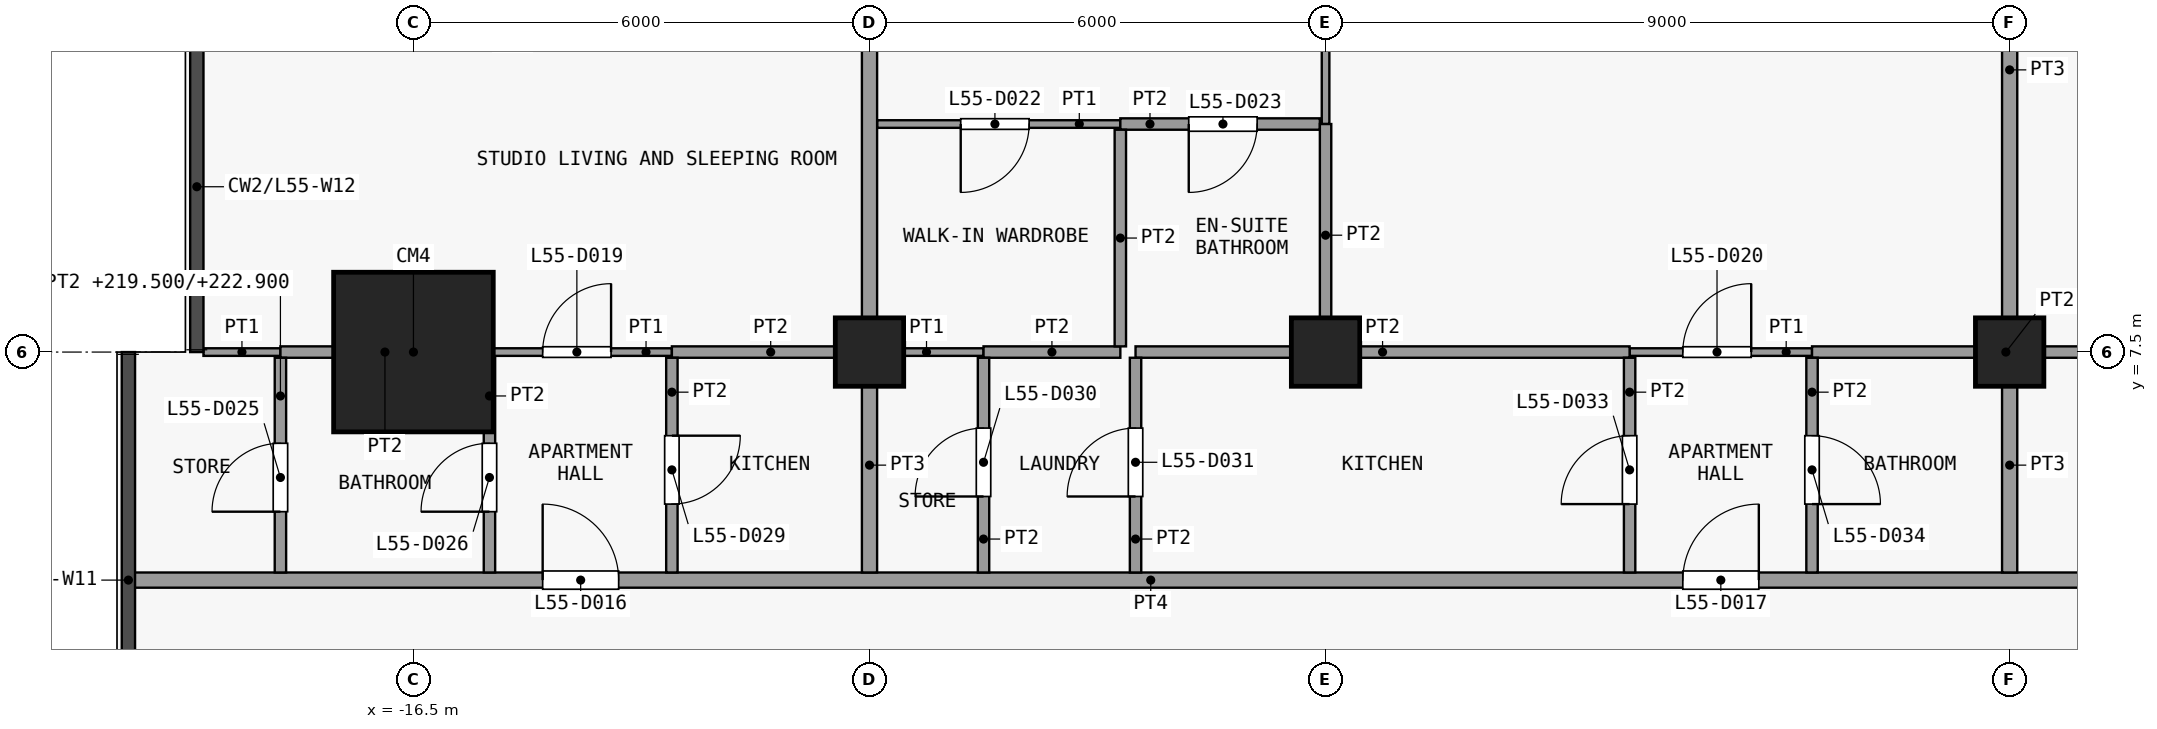
"""IFC4 building model, lengths in metres.
Left out: names, types, materials, properties, quantities, classifications, styles, units other than length and angle.
Written with IfcOpenShell. Run it as: python <this file> out.ifc"""

import sys

from ifc_helpers import new_model, si_unit, direction, frame, frame_2d, origin, origin_2d, place, context, subcontext, project, spatial, rectangle, extrude, element, fill, save


model = new_model("IFC4")
c1 = context("Model", 3, precision=1e-05, world=origin(), true_north=direction((0.0, 1.0)))
c2 = subcontext(c1, "Body", "Model", "MODEL_VIEW")
j1 = project(units=[si_unit("LENGTHUNIT", "METRE"), si_unit("PLANEANGLEUNIT", "RADIAN")], contexts=[c1])
p1 = place(None, origin())
s1 = spatial("IfcSite", under=j1, at=p1, CompositionType="ELEMENT")
p2 = place(p1, origin())
s2 = spatial("IfcBuilding", under=s1, at=p2, CompositionType="ELEMENT")
p3 = place(p2, frame((0.0, 0.0, 219.5)))
s3 = spatial("IfcBuildingStorey", under=s2, at=p3, CompositionType="ELEMENT", Elevation=219.5)
p4 = place(p3, frame((-16.5, 7.5, 0.0), z_axis=(0.0, 0.0, 1.0), x_axis=(1.0, 0.0, 0.0)))
e1 = element("IfcColumn", 1, at=p4, inside=s3, PredefinedType="COLUMN", context=c2, shape_type="SweptSolid", body=[
    extrude(rectangle(XDim=2.1, YDim=2.1, at=origin_2d()), origin(), (0.0, 0.0, 1.0), 3.6),
])
for number, where, z_axis, x_axis in (
    (2, (-10.5, 7.5, 0.0), (0.0, 0.0, 1.0), (1.0, 0.0, 0.0)),
    (3, (-4.5, 7.5, 0.0), (0.0, 0.0, 1.0), (1.0, 0.0, 0.0)),
    (4, (4.5, 7.5, 0.0), (0.0, 0.0, 1.0), (1.0, 0.0, 0.0)),
):
    element("IfcColumn", number, at=place(p3, frame(where, z_axis=z_axis, x_axis=x_axis)), inside=s3, PredefinedType="COLUMN", context=c2, shape_type="SweptSolid", body=[
        extrude(rectangle(XDim=0.9, YDim=0.9, at=origin_2d()), origin(), (0.0, 0.0, 1.0), 3.6),
    ])
p5 = place(p3, frame((-20.25, 4.5, 0.0), z_axis=(0.0, 0.0, 1.0), x_axis=(1.0, 0.0, 0.0)))
e5 = element("IfcWall", 5, at=p5, inside=s3, PredefinedType="PARTITIONING", context=c2, shape_type="SweptSolid", body=[
    extrude(rectangle(XDim=39.6, YDim=0.2, at=frame_2d((19.8, 0.0))), origin(), (0.0, 0.0, 1.0), 3.3),
])
p6 = place(p5, frame((5.45, 0.0, 0.0)))
e6 = element("IfcOpeningElement", 6, at=p6, cuts=e5, PredefinedType="OPENING", context=c2, shape_type="SweptSolid", body=[
    extrude(rectangle(XDim=1.0, YDim=2.1, at=frame_2d((0.5, 1.05))), frame((0.0, 0.11, 0.0), z_axis=(0.0, -1.0, 0.0), x_axis=(1.0, 0.0, 0.0)), (0.0, 0.0, 1.0), 0.22),
])
p7 = place(p5, frame((20.45, 0.0, 0.0)))
e7 = element("IfcOpeningElement", 7, at=p7, cuts=e5, PredefinedType="OPENING", context=c2, shape_type="SweptSolid", body=[
    extrude(rectangle(XDim=1.0, YDim=2.1, at=frame_2d((0.5, 1.05))), frame((0.0, 0.11, 0.0), z_axis=(0.0, -1.0, 0.0), x_axis=(1.0, 0.0, 0.0)), (0.0, 0.0, 1.0), 0.22),
])
p8 = place(p5, frame((27.95, 0.0, 0.0)))
e8 = element("IfcOpeningElement", 8, at=p8, cuts=e5, PredefinedType="OPENING", context=c2, shape_type="SweptSolid", body=[
    extrude(rectangle(XDim=1.0, YDim=2.1, at=frame_2d((0.5, 1.05))), frame((0.0, 0.11, 0.0), z_axis=(0.0, -1.0, 0.0), x_axis=(1.0, 0.0, 0.0)), (0.0, 0.0, 1.0), 0.22),
])
p9 = place(p3, frame((-19.262, 7.5, 0.0), z_axis=(0.0, 0.0, 1.0), x_axis=(1.0, 0.0, 0.0)))
e9 = element("IfcWall", 9, at=p9, inside=s3, PredefinedType="PARTITIONING", context=c2, shape_type="SweptSolid", body=[
    extrude(rectangle(XDim=1.012, YDim=0.1, at=frame_2d((0.506, 0.0))), origin(), (0.0, 0.0, 1.0), 3.3),
])
p10 = place(p3, frame((-15.5, 7.5, 0.0), z_axis=(0.0, 0.0, 1.0), x_axis=(1.0, 0.0, 0.0)))
e10 = element("IfcWall", 10, at=p10, inside=s3, PredefinedType="PARTITIONING", context=c2, shape_type="SweptSolid", body=[
    extrude(rectangle(XDim=2.4, YDim=0.1, at=frame_2d((1.2, 0.0))), origin(), (0.0, 0.0, 1.0), 3.3),
])
p11 = place(p10, frame((0.7, 0.0, 0.0)))
e11 = element("IfcOpeningElement", 11, at=p11, cuts=e10, PredefinedType="OPENING", context=c2, shape_type="SweptSolid", body=[
    extrude(rectangle(XDim=0.9, YDim=2.1, at=frame_2d((0.45, 1.05))), frame((0.0, 0.06, 0.0), z_axis=(0.0, -1.0, 0.0), x_axis=(1.0, 0.0, 0.0)), (0.0, 0.0, 1.0), 0.12),
])
p12 = place(p3, frame((-10.5, 7.5, 0.0), z_axis=(0.0, 0.0, 1.0), x_axis=(1.0, 0.0, 0.0)))
e12 = element("IfcWall", 12, at=p12, inside=s3, PredefinedType="PARTITIONING", context=c2, shape_type="SweptSolid", body=[
    extrude(rectangle(XDim=1.5, YDim=0.1, at=frame_2d((0.75, 0.0))), origin(), (0.0, 0.0, 1.0), 3.3),
])
p13 = place(p3, frame((-0.5, 7.5, 0.0), z_axis=(0.0, 0.0, 1.0), x_axis=(1.0, 0.0, 0.0)))
e13 = element("IfcWall", 13, at=p13, inside=s3, PredefinedType="PARTITIONING", context=c2, shape_type="SweptSolid", body=[
    extrude(rectangle(XDim=2.4, YDim=0.1, at=frame_2d((1.2, 0.0))), origin(), (0.0, 0.0, 1.0), 3.3),
])
p14 = place(p13, frame((0.7, 0.0, 0.0)))
e14 = element("IfcOpeningElement", 14, at=p14, cuts=e13, PredefinedType="OPENING", context=c2, shape_type="SweptSolid", body=[
    extrude(rectangle(XDim=0.9, YDim=2.1, at=frame_2d((0.45, 1.05))), frame((0.0, 0.06, 0.0), z_axis=(0.0, -1.0, 0.0), x_axis=(1.0, 0.0, 0.0)), (0.0, 0.0, 1.0), 0.12),
])
p15 = place(p3, frame((-18.25, 7.5, 0.0), z_axis=(0.0, 0.0, 1.0), x_axis=(1.0, 0.0, 0.0)))
e15 = element("IfcWall", 15, at=p15, inside=s3, PredefinedType="PARTITIONING", context=c2, shape_type="SweptSolid", body=[
    extrude(rectangle(XDim=2.75, YDim=0.15, at=frame_2d((1.375, 0.0))), origin(), (0.0, 0.0, 1.0), 3.3),
])
p16 = place(p3, frame((-13.1, 7.5, 0.0), z_axis=(0.0, 0.0, 1.0), x_axis=(1.0, 0.0, 0.0)))
e16 = element("IfcWall", 16, at=p16, inside=s3, PredefinedType="PARTITIONING", context=c2, shape_type="SweptSolid", body=[
    extrude(rectangle(XDim=2.6, YDim=0.15, at=frame_2d((1.3, 0.0))), origin(), (0.0, 0.0, 1.0), 3.3),
])
p17 = place(p3, frame((-9.0, 7.5, 0.0), z_axis=(0.0, 0.0, 1.0), x_axis=(1.0, 0.0, 0.0)))
e17 = element("IfcWall", 17, at=p17, inside=s3, PredefinedType="PARTITIONING", context=c2, shape_type="SweptSolid", body=[
    extrude(rectangle(XDim=1.8, YDim=0.15, at=frame_2d((0.9, 0.0))), origin(), (0.0, 0.0, 1.0), 3.3),
])
p18 = place(p3, frame((-7.0, 7.5, 0.0), z_axis=(0.0, 0.0, 1.0), x_axis=(1.0, 0.0, 0.0)))
e18 = element("IfcWall", 18, at=p18, inside=s3, PredefinedType="PARTITIONING", context=c2, shape_type="SweptSolid", body=[
    extrude(rectangle(XDim=6.5, YDim=0.15, at=frame_2d((3.25, 0.0))), origin(), (0.0, 0.0, 1.0), 3.3),
])
p19 = place(p3, frame((1.9, 7.5, 0.0), z_axis=(0.0, 0.0, 1.0), x_axis=(1.0, 0.0, 0.0)))
e19 = element("IfcWall", 19, at=p19, inside=s3, PredefinedType="PARTITIONING", context=c2, shape_type="SweptSolid", body=[
    extrude(rectangle(XDim=5.1, YDim=0.15, at=frame_2d((2.55, 0.0))), origin(), (0.0, 0.0, 1.0), 3.3),
])
p20 = place(p3, frame((-10.4, 10.5, 0.0), z_axis=(0.0, 0.0, 1.0), x_axis=(1.0, 0.0, 0.0)))
e20 = element("IfcWall", 20, at=p20, inside=s3, PredefinedType="PARTITIONING", context=c2, shape_type="SweptSolid", body=[
    extrude(rectangle(XDim=3.2, YDim=0.1, at=frame_2d((1.6, 0.0))), origin(), (0.0, 0.0, 1.0), 3.3),
])
p21 = place(p20, frame((1.1, 0.0, 0.0)))
e21 = element("IfcOpeningElement", 21, at=p21, cuts=e20, PredefinedType="OPENING", context=c2, shape_type="SweptSolid", body=[
    extrude(rectangle(XDim=0.9, YDim=2.1, at=frame_2d((0.45, 1.05))), frame((0.0, 0.06, 0.0), z_axis=(0.0, -1.0, 0.0), x_axis=(1.0, 0.0, 0.0)), (0.0, 0.0, 1.0), 0.12),
])
p22 = place(p3, frame((-7.2, 10.5, 0.0), z_axis=(0.0, 0.0, 1.0), x_axis=(1.0, 0.0, 0.0)))
e22 = element("IfcWall", 22, at=p22, inside=s3, PredefinedType="PARTITIONING", context=c2, shape_type="SweptSolid", body=[
    extrude(rectangle(XDim=2.625, YDim=0.15, at=frame_2d((1.312, 0.0))), origin(), (0.0, 0.0, 1.0), 3.3),
])
p23 = place(p22, frame((0.9, 0.0, 0.0)))
e23 = element("IfcOpeningElement", 23, at=p23, cuts=e22, PredefinedType="OPENING", context=c2, shape_type="SweptSolid", body=[
    extrude(rectangle(XDim=0.9, YDim=2.1, at=frame_2d((0.45, 1.05))), frame((0.0, 0.085, 0.0), z_axis=(0.0, -1.0, 0.0), x_axis=(1.0, 0.0, 0.0)), (0.0, 0.0, 1.0), 0.17),
])
p24 = place(p3, frame((-18.25, 4.6, 0.0), z_axis=(0.0, 0.0, 1.0), x_axis=(0.0, 1.0, 0.0)))
e24 = element("IfcWall", 24, at=p24, inside=s3, PredefinedType="PARTITIONING", context=c2, shape_type="SweptSolid", body=[
    extrude(rectangle(XDim=2.825, YDim=0.15, at=frame_2d((1.413, 0.0))), origin(), (0.0, 0.0, 1.0), 3.4),
])
p25 = place(p24, frame((0.8, 0.0, 0.0)))
e25 = element("IfcOpeningElement", 25, at=p25, cuts=e24, PredefinedType="OPENING", context=c2, shape_type="SweptSolid", body=[
    extrude(rectangle(XDim=0.9, YDim=2.1, at=frame_2d((0.45, 1.05))), frame((0.0, 0.085, 0.0), z_axis=(0.0, -1.0, 0.0), x_axis=(1.0, 0.0, 0.0)), (0.0, 0.0, 1.0), 0.17),
])
p26 = place(p3, frame((-15.5, 4.6, 0.0), z_axis=(0.0, 0.0, 1.0), x_axis=(0.0, 1.0, 0.0)))
e26 = element("IfcWall", 26, at=p26, inside=s3, PredefinedType="PARTITIONING", context=c2, shape_type="SweptSolid", body=[
    extrude(rectangle(XDim=2.825, YDim=0.15, at=frame_2d((1.413, 0.0))), origin(), (0.0, 0.0, 1.0), 3.3),
])
p27 = place(p26, frame((0.8, 0.0, 0.0)))
e27 = element("IfcOpeningElement", 27, at=p27, cuts=e26, PredefinedType="OPENING", context=c2, shape_type="SweptSolid", body=[
    extrude(rectangle(XDim=0.9, YDim=2.1, at=frame_2d((0.45, 1.05))), frame((0.0, 0.085, 0.0), z_axis=(0.0, -1.0, 0.0), x_axis=(1.0, 0.0, 0.0)), (0.0, 0.0, 1.0), 0.17),
])
p28 = place(p3, frame((-13.1, 4.6, 0.0), z_axis=(0.0, 0.0, 1.0), x_axis=(0.0, 1.0, 0.0)))
e28 = element("IfcWall", 28, at=p28, inside=s3, PredefinedType="PARTITIONING", context=c2, shape_type="SweptSolid", body=[
    extrude(rectangle(XDim=2.825, YDim=0.15, at=frame_2d((1.413, 0.0))), origin(), (0.0, 0.0, 1.0), 3.3),
])
p29 = place(p28, frame((0.9, 0.0, 0.0)))
e29 = element("IfcOpeningElement", 29, at=p29, cuts=e28, PredefinedType="OPENING", context=c2, shape_type="SweptSolid", body=[
    extrude(rectangle(XDim=0.9, YDim=2.1, at=frame_2d((0.45, 1.05))), frame((0.0, 0.085, 0.0), z_axis=(0.0, -1.0, 0.0), x_axis=(1.0, 0.0, 0.0)), (0.0, 0.0, 1.0), 0.17),
])
p30 = place(p3, frame((-10.5, 4.6, 0.0), z_axis=(0.0, 0.0, 1.0), x_axis=(0.0, 1.0, 0.0)))
e30 = element("IfcWall", 30, at=p30, inside=s3, PredefinedType="PARTITIONING", context=c2, shape_type="SweptSolid", body=[
    extrude(rectangle(XDim=2.825, YDim=0.2, at=frame_2d((1.413, 0.0))), origin(), (0.0, 0.0, 1.0), 3.3),
])
p31 = place(p3, frame((-10.5, 7.575, 0.0), z_axis=(0.0, 0.0, 1.0), x_axis=(0.0, 1.0, 0.0)))
e31 = element("IfcWall", 31, at=p31, inside=s3, PredefinedType="PARTITIONING", context=c2, shape_type="SweptSolid", body=[
    extrude(rectangle(XDim=8.688, YDim=0.2, at=frame_2d((4.344, 0.0))), origin(), (0.0, 0.0, 1.0), 3.3),
])
p32 = place(p3, frame((-9.0, 4.6, 0.0), z_axis=(0.0, 0.0, 1.0), x_axis=(0.0, 1.0, 0.0)))
e32 = element("IfcWall", 32, at=p32, inside=s3, PredefinedType="PARTITIONING", context=c2, shape_type="SweptSolid", body=[
    extrude(rectangle(XDim=2.825, YDim=0.15, at=frame_2d((1.413, 0.0))), origin(), (0.0, 0.0, 1.0), 3.3),
])
p33 = place(p32, frame((1.0, 0.0, 0.0)))
e33 = element("IfcOpeningElement", 33, at=p33, cuts=e32, PredefinedType="OPENING", context=c2, shape_type="SweptSolid", body=[
    extrude(rectangle(XDim=0.9, YDim=2.1, at=frame_2d((0.45, 1.05))), frame((0.0, 0.085, 0.0), z_axis=(0.0, -1.0, 0.0), x_axis=(1.0, 0.0, 0.0)), (0.0, 0.0, 1.0), 0.17),
])
p34 = place(p3, frame((-7.2, 7.575, 0.0), z_axis=(0.0, 0.0, 1.0), x_axis=(0.0, 1.0, 0.0)))
e34 = element("IfcWall", 34, at=p34, inside=s3, PredefinedType="PARTITIONING", context=c2, shape_type="SweptSolid", body=[
    extrude(rectangle(XDim=2.85, YDim=0.15, at=frame_2d((1.425, 0.0))), origin(), (0.0, 0.0, 1.0), 3.3),
])
p35 = place(p3, frame((-7.0, 4.6, 0.0), z_axis=(0.0, 0.0, 1.0), x_axis=(0.0, 1.0, 0.0)))
e35 = element("IfcWall", 35, at=p35, inside=s3, PredefinedType="PARTITIONING", context=c2, shape_type="SweptSolid", body=[
    extrude(rectangle(XDim=2.825, YDim=0.15, at=frame_2d((1.413, 0.0))), origin(), (0.0, 0.0, 1.0), 3.3),
])
p36 = place(p35, frame((1.0, 0.0, 0.0)))
e36 = element("IfcOpeningElement", 36, at=p36, cuts=e35, PredefinedType="OPENING", context=c2, shape_type="SweptSolid", body=[
    extrude(rectangle(XDim=0.9, YDim=2.1, at=frame_2d((0.45, 1.05))), frame((0.0, 0.085, 0.0), z_axis=(0.0, -1.0, 0.0), x_axis=(1.0, 0.0, 0.0)), (0.0, 0.0, 1.0), 0.17),
])
p37 = place(p3, frame((-4.5, 10.5, 0.0), z_axis=(0.0, 0.0, 1.0), x_axis=(0.0, 1.0, 0.0)))
e37 = element("IfcWall", 37, at=p37, inside=s3, PredefinedType="PARTITIONING", context=c2, shape_type="SweptSolid", body=[
    extrude(rectangle(XDim=5.762, YDim=0.1, at=frame_2d((2.881, 0.0))), origin(), (0.0, 0.0, 1.0), 3.3),
])
p38 = place(p37, frame((1.6, 0.0, 0.0)))
e38 = element("IfcOpeningElement", 38, at=p38, cuts=e37, PredefinedType="OPENING", context=c2, shape_type="SweptSolid", body=[
    extrude(rectangle(XDim=0.9, YDim=2.1, at=frame_2d((0.45, 1.05))), frame((0.0, 0.06, 0.0), z_axis=(0.0, -1.0, 0.0), x_axis=(1.0, 0.0, 0.0)), (0.0, 0.0, 1.0), 0.12),
])
p39 = place(p3, frame((-4.5, 7.575, 0.0), z_axis=(0.0, 0.0, 1.0), x_axis=(0.0, 1.0, 0.0)))
e39 = element("IfcWall", 39, at=p39, inside=s3, PredefinedType="PARTITIONING", context=c2, shape_type="SweptSolid", body=[
    extrude(rectangle(XDim=2.925, YDim=0.15, at=frame_2d((1.462, 0.0))), origin(), (0.0, 0.0, 1.0), 3.3),
])
p40 = place(p3, frame((-0.5, 4.6, 0.0), z_axis=(0.0, 0.0, 1.0), x_axis=(0.0, 1.0, 0.0)))
e40 = element("IfcWall", 40, at=p40, inside=s3, PredefinedType="PARTITIONING", context=c2, shape_type="SweptSolid", body=[
    extrude(rectangle(XDim=2.825, YDim=0.15, at=frame_2d((1.413, 0.0))), origin(), (0.0, 0.0, 1.0), 3.3),
])
p41 = place(p40, frame((0.9, 0.0, 0.0)))
e41 = element("IfcOpeningElement", 41, at=p41, cuts=e40, PredefinedType="OPENING", context=c2, shape_type="SweptSolid", body=[
    extrude(rectangle(XDim=0.9, YDim=2.1, at=frame_2d((0.45, 1.05))), frame((0.0, 0.085, 0.0), z_axis=(0.0, -1.0, 0.0), x_axis=(1.0, 0.0, 0.0)), (0.0, 0.0, 1.0), 0.17),
])
p42 = place(p3, frame((1.9, 4.6, 0.0), z_axis=(0.0, 0.0, 1.0), x_axis=(0.0, 1.0, 0.0)))
e42 = element("IfcWall", 42, at=p42, inside=s3, PredefinedType="PARTITIONING", context=c2, shape_type="SweptSolid", body=[
    extrude(rectangle(XDim=2.825, YDim=0.15, at=frame_2d((1.413, 0.0))), origin(), (0.0, 0.0, 1.0), 3.3),
])
p43 = place(p42, frame((0.9, 0.0, 0.0)))
e43 = element("IfcOpeningElement", 43, at=p43, cuts=e42, PredefinedType="OPENING", context=c2, shape_type="SweptSolid", body=[
    extrude(rectangle(XDim=0.9, YDim=2.1, at=frame_2d((0.45, 1.05))), frame((0.0, 0.085, 0.0), z_axis=(0.0, -1.0, 0.0), x_axis=(1.0, 0.0, 0.0)), (0.0, 0.0, 1.0), 0.17),
])
p44 = place(p3, frame((4.5, 4.6, 0.0), z_axis=(0.0, 0.0, 1.0), x_axis=(0.0, 1.0, 0.0)))
e44 = element("IfcWall", 44, at=p44, inside=s3, PredefinedType="PARTITIONING", context=c2, shape_type="SweptSolid", body=[
    extrude(rectangle(XDim=2.825, YDim=0.2, at=frame_2d((1.413, 0.0))), origin(), (0.0, 0.0, 1.0), 3.3),
])
p45 = place(p3, frame((4.5, 7.575, 0.0), z_axis=(0.0, 0.0, 1.0), x_axis=(0.0, 1.0, 0.0)))
e45 = element("IfcWall", 45, at=p45, inside=s3, PredefinedType="PARTITIONING", context=c2, shape_type="SweptSolid", body=[
    extrude(rectangle(XDim=7.275, YDim=0.2, at=frame_2d((3.638, 0.0))), origin(), (0.0, 0.0, 1.0), 3.3),
])
p46 = place(p6, origin())
e46 = element("IfcDoor", 46, at=p46, inside=s3, OperationType="SINGLE_SWING_RIGHT", PredefinedType="DOOR", context=c2, shape_type="SweptSolid", body=[
    extrude(rectangle(XDim=1.0, YDim=2.1, at=frame_2d((0.5, 1.05))), frame((0.0, 0.025, 0.0), z_axis=(0.0, -1.0, 0.0), x_axis=(1.0, 0.0, 0.0)), (0.0, 0.0, 1.0), 0.05),
])
fill(e6, e46)
p47 = place(p7, origin())
e47 = element("IfcDoor", 47, at=p47, inside=s3, OperationType="SINGLE_SWING_LEFT", PredefinedType="DOOR", context=c2, shape_type="SweptSolid", body=[
    extrude(rectangle(XDim=1.0, YDim=2.1, at=frame_2d((0.5, 1.05))), frame((0.0, 0.025, 0.0), z_axis=(0.0, -1.0, 0.0), x_axis=(1.0, 0.0, 0.0)), (0.0, 0.0, 1.0), 0.05),
])
fill(e7, e47)
p48 = place(p11, origin())
e48 = element("IfcDoor", 48, at=p48, inside=s3, OperationType="SINGLE_SWING_LEFT", PredefinedType="DOOR", context=c2, shape_type="SweptSolid", body=[
    extrude(rectangle(XDim=0.9, YDim=2.1, at=frame_2d((0.45, 1.05))), frame((0.0, 0.025, 0.0), z_axis=(0.0, -1.0, 0.0), x_axis=(1.0, 0.0, 0.0)), (0.0, 0.0, 1.0), 0.05),
])
fill(e11, e48)
p49 = place(p14, origin())
e49 = element("IfcDoor", 49, at=p49, inside=s3, OperationType="SINGLE_SWING_LEFT", PredefinedType="DOOR", context=c2, shape_type="SweptSolid", body=[
    extrude(rectangle(XDim=0.9, YDim=2.1, at=frame_2d((0.45, 1.05))), frame((0.0, 0.025, 0.0), z_axis=(0.0, -1.0, 0.0), x_axis=(1.0, 0.0, 0.0)), (0.0, 0.0, 1.0), 0.05),
])
fill(e14, e49)
p50 = place(p21, origin())
e50 = element("IfcDoor", 50, at=p50, inside=s3, OperationType="SINGLE_SWING_LEFT", PredefinedType="DOOR", context=c2, shape_type="SweptSolid", body=[
    extrude(rectangle(XDim=0.9, YDim=2.1, at=frame_2d((0.45, 1.05))), frame((0.0, 0.025, 0.0), z_axis=(0.0, -1.0, 0.0), x_axis=(1.0, 0.0, 0.0)), (0.0, 0.0, 1.0), 0.05),
])
fill(e21, e50)
p51 = place(p23, origin())
e51 = element("IfcDoor", 51, at=p51, inside=s3, OperationType="SINGLE_SWING_LEFT", PredefinedType="DOOR", context=c2, shape_type="SweptSolid", body=[
    extrude(rectangle(XDim=0.9, YDim=2.1, at=frame_2d((0.45, 1.05))), frame((0.0, 0.025, 0.0), z_axis=(0.0, -1.0, 0.0), x_axis=(1.0, 0.0, 0.0)), (0.0, 0.0, 1.0), 0.05),
])
fill(e23, e51)
p52 = place(p25, origin())
e52 = element("IfcDoor", 52, at=p52, inside=s3, OperationType="SINGLE_SWING_RIGHT", PredefinedType="DOOR", context=c2, shape_type="SweptSolid", body=[
    extrude(rectangle(XDim=0.9, YDim=2.1, at=frame_2d((0.45, 1.05))), frame((0.0, 0.025, 0.0), z_axis=(0.0, -1.0, 0.0), x_axis=(1.0, 0.0, 0.0)), (0.0, 0.0, 1.0), 0.05),
])
fill(e25, e52)
p53 = place(p27, origin())
e53 = element("IfcDoor", 53, at=p53, inside=s3, OperationType="SINGLE_SWING_RIGHT", PredefinedType="DOOR", context=c2, shape_type="SweptSolid", body=[
    extrude(rectangle(XDim=0.9, YDim=2.1, at=frame_2d((0.45, 1.05))), frame((0.0, 0.025, 0.0), z_axis=(0.0, -1.0, 0.0), x_axis=(1.0, 0.0, 0.0)), (0.0, 0.0, 1.0), 0.05),
])
fill(e27, e53)
p54 = place(p29, origin())
e54 = element("IfcDoor", 54, at=p54, inside=s3, OperationType="SINGLE_SWING_RIGHT", PredefinedType="DOOR", context=c2, shape_type="SweptSolid", body=[
    extrude(rectangle(XDim=0.9, YDim=2.1, at=frame_2d((0.45, 1.05))), frame((0.0, 0.025, 0.0), z_axis=(0.0, -1.0, 0.0), x_axis=(1.0, 0.0, 0.0)), (0.0, 0.0, 1.0), 0.05),
])
fill(e29, e54)
p55 = place(p33, origin())
e55 = element("IfcDoor", 55, at=p55, inside=s3, OperationType="SINGLE_SWING_RIGHT", PredefinedType="DOOR", context=c2, shape_type="SweptSolid", body=[
    extrude(rectangle(XDim=0.9, YDim=2.1, at=frame_2d((0.45, 1.05))), frame((0.0, 0.025, 0.0), z_axis=(0.0, -1.0, 0.0), x_axis=(1.0, 0.0, 0.0)), (0.0, 0.0, 1.0), 0.05),
])
fill(e33, e55)
p56 = place(p36, origin())
e56 = element("IfcDoor", 56, at=p56, inside=s3, OperationType="SINGLE_SWING_RIGHT", PredefinedType="DOOR", context=c2, shape_type="SweptSolid", body=[
    extrude(rectangle(XDim=0.9, YDim=2.1, at=frame_2d((0.45, 1.05))), frame((0.0, 0.025, 0.0), z_axis=(0.0, -1.0, 0.0), x_axis=(1.0, 0.0, 0.0)), (0.0, 0.0, 1.0), 0.05),
])
fill(e36, e56)
p57 = place(p41, origin())
e57 = element("IfcDoor", 57, at=p57, inside=s3, OperationType="SINGLE_SWING_RIGHT", PredefinedType="DOOR", context=c2, shape_type="SweptSolid", body=[
    extrude(rectangle(XDim=0.9, YDim=2.1, at=frame_2d((0.45, 1.05))), frame((0.0, 0.025, 0.0), z_axis=(0.0, -1.0, 0.0), x_axis=(1.0, 0.0, 0.0)), (0.0, 0.0, 1.0), 0.05),
])
fill(e41, e57)
p58 = place(p43, origin())
e58 = element("IfcDoor", 58, at=p58, inside=s3, OperationType="SINGLE_SWING_LEFT", PredefinedType="DOOR", context=c2, shape_type="SweptSolid", body=[
    extrude(rectangle(XDim=0.9, YDim=2.1, at=frame_2d((0.45, 1.05))), frame((0.0, 0.025, 0.0), z_axis=(0.0, -1.0, 0.0), x_axis=(1.0, 0.0, 0.0)), (0.0, 0.0, 1.0), 0.05),
])
fill(e43, e58)
save(model, sys.argv[1])
